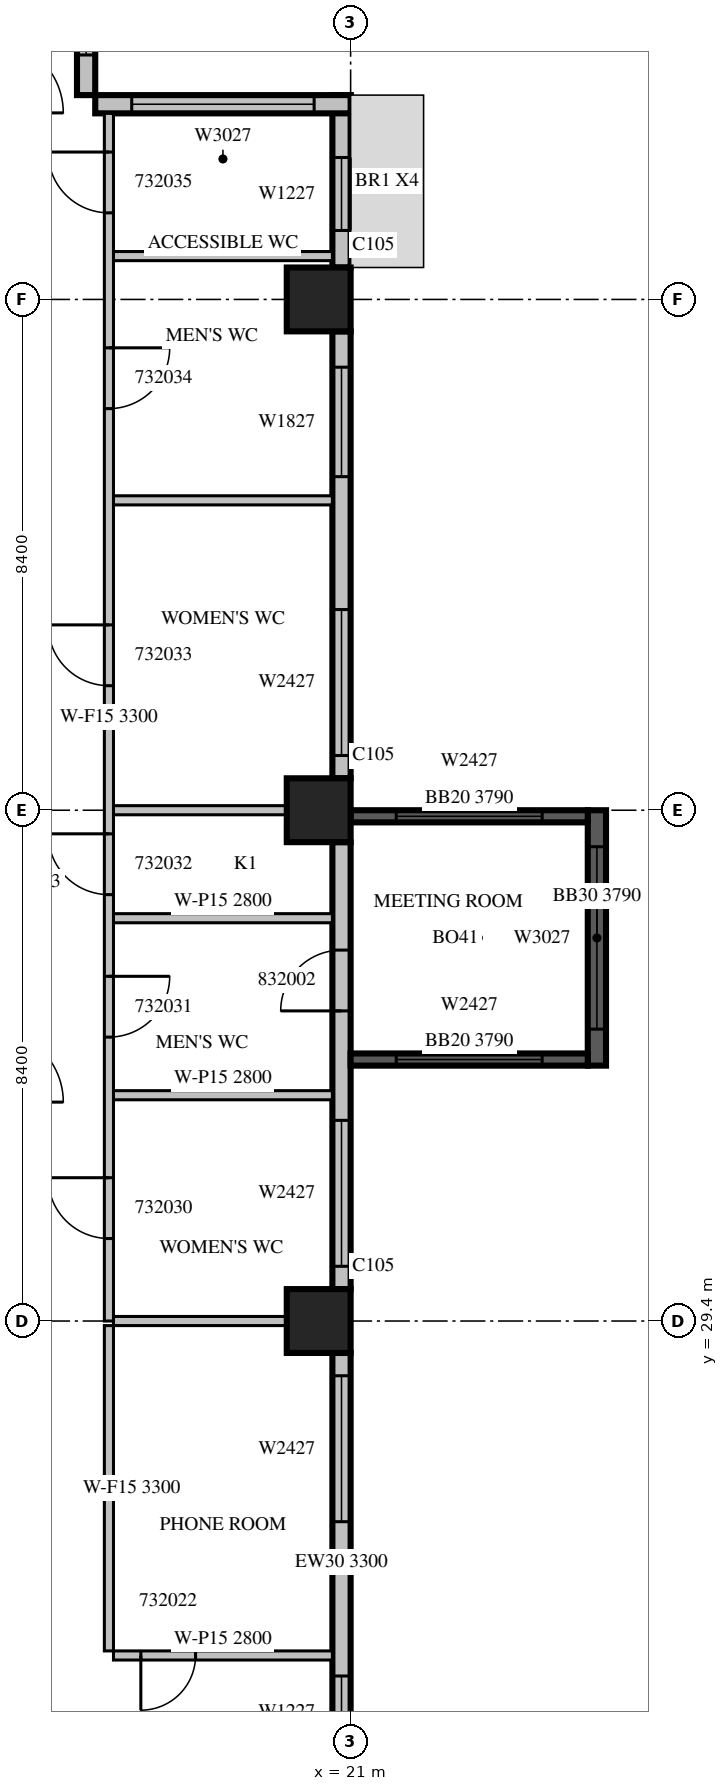
"""IFC4 building model, lengths in metres.
Left out: names, types, materials, properties, quantities, classifications, styles, units other than length and angle.
Written with IfcOpenShell. Run it as: python <this file> out.ifc"""

import sys

from ifc_helpers import new_model, si_unit, direction, frame, frame_2d, origin, origin_2d, place, context, subcontext, project, spatial, rectangle, extrude, source, transform, mapped, element, fill, save


model = new_model("IFC4")
c1 = context("Model", 3, precision=1e-05, world=origin(), true_north=direction((0.0, 1.0)))
c2 = subcontext(c1, "Body", "Model", "MODEL_VIEW")
j1 = project(units=[si_unit("LENGTHUNIT", "METRE"), si_unit("PLANEANGLEUNIT", "RADIAN")], contexts=[c1])
p1 = place(None, origin())
s1 = spatial("IfcSite", under=j1, at=p1, CompositionType="ELEMENT")
p2 = place(p1, origin())
s2 = spatial("IfcBuilding", under=s1, at=p2, CompositionType="ELEMENT")
p3 = place(p2, frame((0.0, 0.0, 145.5)))
s3 = spatial("IfcBuildingStorey", under=s2, at=p3, CompositionType="ELEMENT", Elevation=145.5)
m1 = source(origin(), c2, "Body", "SweptSolid", [
    extrude(rectangle(XDim=1.05, YDim=1.05, at=origin_2d()), origin(), (0.0, 0.0, 1.0), 4.2),
])
for number, where, z_axis, x_axis in (
    (1, (20.475, 29.4, 0.0), (0.0, 0.0, 1.0), (1.0, 0.0, 0.0)),
    (2, (20.475, 37.8, 0.0), (0.0, 0.0, 1.0), (1.0, 0.0, 0.0)),
    (3, (20.475, 46.2, 0.0), (0.0, 0.0, 1.0), (1.0, 0.0, 0.0)),
):
    element("IfcColumn", number, at=place(p3, frame(where, z_axis=z_axis, x_axis=x_axis)), inside=s3, PredefinedType="COLUMN", context=c2, shape_type="MappedRepresentation", body=[
        mapped(m1, transform((0.0, 0.0, 0.0), scale=1.0)),
    ])
m2 = source(origin(), c2, "Body", "SweptSolid", [
    extrude(rectangle(XDim=6.875, YDim=0.3, at=frame_2d((3.438, 0.0))), origin(), (0.0, 0.0, 1.0), 3.3),
])
p4 = place(p3, frame((20.85, 22.0, 0.0), z_axis=(0.0, 0.0, 1.0), x_axis=(0.0, 1.0, 0.0)))
e4 = element("IfcWall", 4, at=p4, inside=s3, PredefinedType="STANDARD", context=c2, shape_type="MappedRepresentation", body=[
    mapped(m2, transform((0.0, 0.0, 0.0), scale=1.0)),
])
m3 = source(origin(), c2, "Body", "SweptSolid", [
    extrude(rectangle(XDim=1.2, YDim=2.7, at=frame_2d((0.6, 1.35))), frame((0.0, 0.16, 0.0), z_axis=(0.0, -1.0, 0.0), x_axis=(1.0, 0.0, 0.0)), (0.0, 0.0, 1.0), 0.32),
])
p5 = place(p4, frame((0.362, 0.0, 0.6)))
e5 = element("IfcOpeningElement", 5, at=p5, cuts=e4, PredefinedType="OPENING", context=c2, shape_type="MappedRepresentation", body=[
    mapped(m3, transform((0.0, 0.0, 0.0), scale=1.0)),
])
m4 = source(origin(), c2, "Body", "SweptSolid", [
    extrude(rectangle(XDim=2.4, YDim=2.7, at=frame_2d((1.2, 1.35))), frame((0.0, 0.16, 0.0), z_axis=(0.0, -1.0, 0.0), x_axis=(1.0, 0.0, 0.0)), (0.0, 0.0, 1.0), 0.32),
])
p6 = place(p4, frame((4.1, 0.0, 0.6)))
e6 = element("IfcOpeningElement", 6, at=p6, cuts=e4, PredefinedType="OPENING", context=c2, shape_type="MappedRepresentation", body=[
    mapped(m4, transform((0.0, 0.0, 0.0), scale=1.0)),
])
m5 = source(origin(), c2, "Body", "SweptSolid", [
    extrude(rectangle(XDim=7.35, YDim=0.3, at=frame_2d((3.675, 0.0))), origin(), (0.0, 0.0, 1.0), 3.8),
])
p7 = place(p3, frame((20.85, 29.925, 0.0), z_axis=(0.0, 0.0, 1.0), x_axis=(0.0, 1.0, 0.0)))
e7 = element("IfcWall", 7, at=p7, inside=s3, PredefinedType="STANDARD", context=c2, shape_type="MappedRepresentation", body=[
    mapped(m5, transform((0.0, 0.0, 0.0), scale=1.0)),
])
p8 = place(p7, frame((0.375, 0.0, 0.6)))
e8 = element("IfcOpeningElement", 8, at=p8, cuts=e7, PredefinedType="OPENING", context=c2, shape_type="MappedRepresentation", body=[
    mapped(m4, transform((0.0, 0.0, 0.0), scale=1.0)),
])
m6 = source(origin(), c2, "Body", "SweptSolid", [
    extrude(rectangle(XDim=1.0, YDim=2.1, at=frame_2d((0.5, 1.05))), frame((0.0, 0.16, 0.0), z_axis=(0.0, -1.0, 0.0), x_axis=(1.0, 0.0, 0.0)), (0.0, 0.0, 1.0), 0.32),
])
p9 = place(p7, frame((4.575, 0.0, 0.0)))
e9 = element("IfcOpeningElement", 9, at=p9, cuts=e7, PredefinedType="OPENING", context=c2, shape_type="MappedRepresentation", body=[
    mapped(m6, transform((0.0, 0.0, 0.0), scale=1.0)),
])
p10 = place(p3, frame((20.85, 38.325, 0.0), z_axis=(0.0, 0.0, 1.0), x_axis=(0.0, 1.0, 0.0)))
e10 = element("IfcWall", 10, at=p10, inside=s3, PredefinedType="STANDARD", context=c2, shape_type="MappedRepresentation", body=[
    mapped(m5, transform((0.0, 0.0, 0.0), scale=1.0)),
])
p11 = place(p10, frame((0.375, 0.0, 0.6)))
e11 = element("IfcOpeningElement", 11, at=p11, cuts=e10, PredefinedType="OPENING", context=c2, shape_type="MappedRepresentation", body=[
    mapped(m4, transform((0.0, 0.0, 0.0), scale=1.0)),
])
m7 = source(origin(), c2, "Body", "SweptSolid", [
    extrude(rectangle(XDim=1.8, YDim=2.7, at=frame_2d((0.9, 1.35))), frame((0.0, 0.16, 0.0), z_axis=(0.0, -1.0, 0.0), x_axis=(1.0, 0.0, 0.0)), (0.0, 0.0, 1.0), 0.32),
])
p12 = place(p10, frame((4.96, 0.0, 0.6)))
e12 = element("IfcOpeningElement", 12, at=p12, cuts=e10, PredefinedType="OPENING", context=c2, shape_type="MappedRepresentation", body=[
    mapped(m7, transform((0.0, 0.0, 0.0), scale=1.0)),
])
m8 = source(origin(), c2, "Body", "SweptSolid", [
    extrude(rectangle(XDim=2.835, YDim=0.3, at=frame_2d((1.417, 0.0))), origin(), (0.0, 0.0, 1.0), 3.8),
])
p13 = place(p3, frame((20.85, 46.725, 0.0), z_axis=(0.0, 0.0, 1.0), x_axis=(0.0, 1.0, 0.0)))
e13 = element("IfcWall", 13, at=p13, inside=s3, PredefinedType="STANDARD", context=c2, shape_type="MappedRepresentation", body=[
    mapped(m8, transform((0.0, 0.0, 0.0), scale=1.0)),
])
p14 = place(p13, frame((0.609, 0.0, 0.6)))
e14 = element("IfcOpeningElement", 14, at=p14, cuts=e13, PredefinedType="OPENING", context=c2, shape_type="MappedRepresentation", body=[
    mapped(m3, transform((0.0, 0.0, 0.0), scale=1.0)),
])
m9 = source(origin(), c2, "Body", "SweptSolid", [
    extrude(rectangle(XDim=4.2, YDim=0.3, at=frame_2d((2.1, 0.0))), origin(), (0.0, 0.0, 1.0), 3.8),
])
p15 = place(p3, frame((21.0, 49.41, 0.0), z_axis=(0.0, 0.0, 1.0), x_axis=(-1.0, 0.0, 0.0)))
e15 = element("IfcWall", 15, at=p15, inside=s3, PredefinedType="STANDARD", context=c2, shape_type="MappedRepresentation", body=[
    mapped(m9, transform((0.0, 0.0, 0.0), scale=1.0)),
])
m10 = source(origin(), c2, "Body", "SweptSolid", [
    extrude(rectangle(XDim=3.0, YDim=2.7, at=frame_2d((1.5, 1.35))), frame((0.0, 0.16, 0.0), z_axis=(0.0, -1.0, 0.0), x_axis=(1.0, 0.0, 0.0)), (0.0, 0.0, 1.0), 0.32),
])
p16 = place(p15, frame((0.6, 0.0, 0.6)))
e16 = element("IfcOpeningElement", 16, at=p16, cuts=e15, PredefinedType="OPENING", context=c2, shape_type="MappedRepresentation", body=[
    mapped(m10, transform((0.0, 0.0, 0.0), scale=1.0)),
])
m11 = source(origin(), c2, "Body", "SweptSolid", [
    extrude(rectangle(XDim=2.52, YDim=0.3, at=frame_2d((1.26, 0.0))), origin(), (0.0, 0.0, 1.0), 3.8),
])
p17 = place(p3, frame((16.65, 49.56, 0.0), z_axis=(0.0, 0.0, 1.0), x_axis=(0.0, 1.0, 0.0)))
e17 = element("IfcWall", 17, at=p17, inside=s3, PredefinedType="STANDARD", context=c2, shape_type="MappedRepresentation", body=[
    mapped(m11, transform((0.0, 0.0, 0.0), scale=1.0)),
])
p18 = place(p17, frame((0.66, 0.0, 0.6)))
e18 = element("IfcOpeningElement", 18, at=p18, cuts=e17, PredefinedType="OPENING", context=c2, shape_type="MappedRepresentation", body=[
    mapped(m3, transform((0.0, 0.0, 0.0), scale=1.0)),
])
m12 = source(origin(), c2, "Body", "SweptSolid", [
    extrude(rectangle(XDim=4.2, YDim=0.3, at=frame_2d((2.1, 0.0))), origin(), (0.0, 0.0, 1.0), 3.79),
])
p19 = place(p3, frame((25.05, 33.6, 0.0), z_axis=(0.0, 0.0, 1.0), x_axis=(0.0, 1.0, 0.0)))
e19 = element("IfcWall", 19, at=p19, inside=s3, PredefinedType="SOLIDWALL", context=c2, shape_type="MappedRepresentation", body=[
    mapped(m12, transform((0.0, 0.0, 0.0), scale=1.0)),
])
p20 = place(p19, frame((0.6, 0.0, 0.6)))
e20 = element("IfcOpeningElement", 20, at=p20, cuts=e19, PredefinedType="OPENING", context=c2, shape_type="MappedRepresentation", body=[
    mapped(m10, transform((0.0, 0.0, 0.0), scale=1.0)),
])
m13 = source(origin(), c2, "Body", "SweptSolid", [
    extrude(rectangle(XDim=3.9, YDim=0.2, at=frame_2d((1.95, 0.0))), origin(), (0.0, 0.0, 1.0), 3.79),
])
p21 = place(p3, frame((21.0, 33.7, 0.0), z_axis=(0.0, 0.0, 1.0), x_axis=(1.0, 0.0, 0.0)))
e21 = element("IfcWall", 21, at=p21, inside=s3, PredefinedType="SOLIDWALL", context=c2, shape_type="MappedRepresentation", body=[
    mapped(m13, transform((0.0, 0.0, 0.0), scale=1.0)),
])
m14 = source(origin(), c2, "Body", "SweptSolid", [
    extrude(rectangle(XDim=2.4, YDim=2.7, at=frame_2d((1.2, 1.35))), frame((0.0, 0.11, 0.0), z_axis=(0.0, -1.0, 0.0), x_axis=(1.0, 0.0, 0.0)), (0.0, 0.0, 1.0), 0.22),
])
p22 = place(p21, frame((0.75, 0.0, 0.6)))
e22 = element("IfcOpeningElement", 22, at=p22, cuts=e21, PredefinedType="OPENING", context=c2, shape_type="MappedRepresentation", body=[
    mapped(m14, transform((0.0, 0.0, 0.0), scale=1.0)),
])
p23 = place(p3, frame((21.0, 37.7, 0.0), z_axis=(0.0, 0.0, 1.0), x_axis=(1.0, 0.0, 0.0)))
e23 = element("IfcWall", 23, at=p23, inside=s3, PredefinedType="SOLIDWALL", context=c2, shape_type="MappedRepresentation", body=[
    mapped(m13, transform((0.0, 0.0, 0.0), scale=1.0)),
])
p24 = place(p23, frame((0.75, 0.0, 0.6)))
e24 = element("IfcOpeningElement", 24, at=p24, cuts=e23, PredefinedType="OPENING", context=c2, shape_type="MappedRepresentation", body=[
    mapped(m14, transform((0.0, 0.0, 0.0), scale=1.0)),
])
m15 = source(origin(), c2, "Body", "SweptSolid", [
    extrude(rectangle(XDim=3.6, YDim=0.15, at=frame_2d((1.8, 0.0))), origin(), (0.0, 0.0, 1.0), 2.8),
])
p25 = place(p3, frame((17.1, 23.9, 0.0), z_axis=(0.0, 0.0, 1.0), x_axis=(1.0, 0.0, 0.0)))
e25 = element("IfcWall", 25, at=p25, inside=s3, PredefinedType="PARTITIONING", context=c2, shape_type="MappedRepresentation", body=[
    mapped(m15, transform((0.0, 0.0, 0.0), scale=1.0)),
])
m16 = source(origin(), c2, "Body", "SweptSolid", [
    extrude(rectangle(XDim=0.9, YDim=2.1, at=frame_2d((0.45, 1.05))), frame((0.0, 0.085, 0.0), z_axis=(0.0, -1.0, 0.0), x_axis=(1.0, 0.0, 0.0)), (0.0, 0.0, 1.0), 0.17),
])
p26 = place(p25, frame((0.45, 0.0, 0.0)))
e26 = element("IfcOpeningElement", 26, at=p26, cuts=e25, PredefinedType="OPENING", context=c2, shape_type="MappedRepresentation", body=[
    mapped(m16, transform((0.0, 0.0, 0.0), scale=1.0)),
])
m17 = source(origin(), c2, "Body", "SweptSolid", [
    extrude(rectangle(XDim=5.35, YDim=0.15, at=frame_2d((2.675, 0.0))), origin(), (0.0, 0.0, 1.0), 3.3),
])
p27 = place(p3, frame((17.025, 29.325, 0.0), z_axis=(0.0, 0.0, 1.0), x_axis=(0.0, -1.0, 0.0)))
e27 = element("IfcWall", 27, at=p27, inside=s3, PredefinedType="PARTITIONING", context=c2, shape_type="MappedRepresentation", body=[
    mapped(m17, transform((0.0, 0.0, 0.0), scale=1.0)),
])
m18 = source(origin(), c2, "Body", "SweptSolid", [
    extrude(rectangle(XDim=2.851, YDim=0.15, at=frame_2d((1.425, 0.0))), origin(), (0.0, 0.0, 1.0), 3.8),
])
p28 = place(p3, frame((19.951, 29.4, 0.0), z_axis=(0.0, 0.0, 1.0), x_axis=(-1.0, 0.0, 0.0)))
e28 = element("IfcWall", 28, at=p28, inside=s3, PredefinedType="PARTITIONING", context=c2, shape_type="MappedRepresentation", body=[
    mapped(m18, transform((0.0, 0.0, 0.0), scale=1.0)),
])
for number, where, z_axis, x_axis in (
    (29, (17.1, 33.113, 0.0), (0.0, 0.0, 1.0), (1.0, 0.0, 0.0)),
    (30, (17.1, 36.024, 0.0), (0.0, 0.0, 1.0), (1.0, 0.0, 0.0)),
):
    element("IfcWall", number, at=place(p3, frame(where, z_axis=z_axis, x_axis=x_axis)), inside=s3, PredefinedType="PARTITIONING", context=c2, shape_type="MappedRepresentation", body=[
        mapped(m15, transform((0.0, 0.0, 0.0), scale=1.0)),
    ])
m19 = source(origin(), c2, "Body", "SweptSolid", [
    extrude(rectangle(XDim=3.6, YDim=0.15, at=frame_2d((1.8, 0.0))), origin(), (0.0, 0.0, 1.0), 3.8),
])
for number, where, z_axis, x_axis in (
    (31, (17.1, 42.896, 0.0), (0.0, 0.0, 1.0), (1.0, 0.0, 0.0)),
    (32, (17.1, 46.913, 0.0), (0.0, 0.0, 1.0), (1.0, 0.0, 0.0)),
):
    element("IfcWall", number, at=place(p3, frame(where, z_axis=z_axis, x_axis=x_axis)), inside=s3, PredefinedType="PARTITIONING", context=c2, shape_type="MappedRepresentation", body=[
        mapped(m19, transform((0.0, 0.0, 0.0), scale=1.0)),
    ])
p29 = place(p3, frame((19.951, 37.8, 0.0), z_axis=(0.0, 0.0, 1.0), x_axis=(-1.0, 0.0, 0.0)))
e33 = element("IfcWall", 33, at=p29, inside=s3, PredefinedType="PARTITIONING", context=c2, shape_type="MappedRepresentation", body=[
    mapped(m18, transform((0.0, 0.0, 0.0), scale=1.0)),
])
m20 = source(origin(), c2, "Body", "SweptSolid", [
    extrude(rectangle(XDim=19.86, YDim=0.15, at=frame_2d((9.93, 0.0))), origin(), (0.0, 0.0, 1.0), 3.3),
])
p30 = place(p3, frame((17.025, 49.26, 0.0), z_axis=(0.0, 0.0, 1.0), x_axis=(0.0, -1.0, 0.0)))
e34 = element("IfcWall", 34, at=p30, inside=s3, PredefinedType="PARTITIONING", context=c2, shape_type="MappedRepresentation", body=[
    mapped(m20, transform((0.0, 0.0, 0.0), scale=1.0)),
])
m21 = source(origin(), c2, "Body", "SweptSolid", [
    extrude(rectangle(XDim=1.0, YDim=2.1, at=frame_2d((0.5, 1.05))), frame((0.0, 0.085, 0.0), z_axis=(0.0, -1.0, 0.0), x_axis=(1.0, 0.0, 0.0)), (0.0, 0.0, 1.0), 0.17),
])
p31 = place(p30, frame((17.503, 0.0, 0.0)))
e35 = element("IfcOpeningElement", 35, at=p31, cuts=e34, PredefinedType="OPENING", context=c2, shape_type="MappedRepresentation", body=[
    mapped(m21, transform((0.0, 0.0, 0.0), scale=1.0)),
])
p32 = place(p30, frame((14.191, 0.0, 0.0)))
e36 = element("IfcOpeningElement", 36, at=p32, cuts=e34, PredefinedType="OPENING", context=c2, shape_type="MappedRepresentation", body=[
    mapped(m21, transform((0.0, 0.0, 0.0), scale=1.0)),
])
p33 = place(p30, frame((11.848, 0.0, 0.0)))
e37 = element("IfcOpeningElement", 37, at=p33, cuts=e34, PredefinedType="OPENING", context=c2, shape_type="MappedRepresentation", body=[
    mapped(m21, transform((0.0, 0.0, 0.0), scale=1.0)),
])
p34 = place(p30, frame((8.412, 0.0, 0.0)))
e38 = element("IfcOpeningElement", 38, at=p34, cuts=e34, PredefinedType="OPENING", context=c2, shape_type="MappedRepresentation", body=[
    mapped(m21, transform((0.0, 0.0, 0.0), scale=1.0)),
])
p35 = place(p30, frame((3.856, 0.0, 0.0)))
e39 = element("IfcOpeningElement", 39, at=p35, cuts=e34, PredefinedType="OPENING", context=c2, shape_type="MappedRepresentation", body=[
    mapped(m21, transform((0.0, 0.0, 0.0), scale=1.0)),
])
p36 = place(p30, frame((0.636, 0.0, 0.0)))
e40 = element("IfcOpeningElement", 40, at=p36, cuts=e34, PredefinedType="OPENING", context=c2, shape_type="MappedRepresentation", body=[
    mapped(m21, transform((0.0, 0.0, 0.0), scale=1.0)),
])
m22 = source(origin(), c2, "Body", "SweptSolid", [
    extrude(rectangle(XDim=1.2, YDim=2.7, at=frame_2d((0.6, 1.35))), frame((0.0, 0.03, 0.0), z_axis=(0.0, -1.0, 0.0), x_axis=(1.0, 0.0, 0.0)), (0.0, 0.0, 1.0), 0.06),
])
p37 = place(p5, origin())
e41 = element("IfcWindow", 41, at=p37, inside=s3, PartitioningType="SINGLE_PANEL", PredefinedType="WINDOW", context=c2, shape_type="MappedRepresentation", body=[
    mapped(m22, transform((0.0, 0.0, 0.0), scale=1.0)),
])
fill(e5, e41)
m23 = source(origin(), c2, "Body", "SweptSolid", [
    extrude(rectangle(XDim=2.4, YDim=2.7, at=frame_2d((1.2, 1.35))), frame((0.0, 0.03, 0.0), z_axis=(0.0, -1.0, 0.0), x_axis=(1.0, 0.0, 0.0)), (0.0, 0.0, 1.0), 0.06),
])
p38 = place(p6, origin())
e42 = element("IfcWindow", 42, at=p38, inside=s3, PartitioningType="SINGLE_PANEL", PredefinedType="WINDOW", context=c2, shape_type="MappedRepresentation", body=[
    mapped(m23, transform((0.0, 0.0, 0.0), scale=1.0)),
])
fill(e6, e42)
p39 = place(p8, origin())
e43 = element("IfcWindow", 43, at=p39, inside=s3, PartitioningType="SINGLE_PANEL", PredefinedType="WINDOW", context=c2, shape_type="MappedRepresentation", body=[
    mapped(m23, transform((0.0, 0.0, 0.0), scale=1.0)),
])
fill(e8, e43)
p40 = place(p11, origin())
e44 = element("IfcWindow", 44, at=p40, inside=s3, PartitioningType="SINGLE_PANEL", PredefinedType="WINDOW", context=c2, shape_type="MappedRepresentation", body=[
    mapped(m23, transform((0.0, 0.0, 0.0), scale=1.0)),
])
fill(e11, e44)
m24 = source(origin(), c2, "Body", "SweptSolid", [
    extrude(rectangle(XDim=1.8, YDim=2.7, at=frame_2d((0.9, 1.35))), frame((0.0, 0.03, 0.0), z_axis=(0.0, -1.0, 0.0), x_axis=(1.0, 0.0, 0.0)), (0.0, 0.0, 1.0), 0.06),
])
p41 = place(p12, origin())
e45 = element("IfcWindow", 45, at=p41, inside=s3, PartitioningType="SINGLE_PANEL", PredefinedType="WINDOW", context=c2, shape_type="MappedRepresentation", body=[
    mapped(m24, transform((0.0, 0.0, 0.0), scale=1.0)),
])
fill(e12, e45)
p42 = place(p14, origin())
e46 = element("IfcWindow", 46, at=p42, inside=s3, PartitioningType="SINGLE_PANEL", PredefinedType="WINDOW", context=c2, shape_type="MappedRepresentation", body=[
    mapped(m22, transform((0.0, 0.0, 0.0), scale=1.0)),
])
fill(e14, e46)
m25 = source(origin(), c2, "Body", "SweptSolid", [
    extrude(rectangle(XDim=3.0, YDim=2.7, at=frame_2d((1.5, 1.35))), frame((0.0, 0.03, 0.0), z_axis=(0.0, -1.0, 0.0), x_axis=(1.0, 0.0, 0.0)), (0.0, 0.0, 1.0), 0.06),
])
p43 = place(p16, origin())
e47 = element("IfcWindow", 47, at=p43, inside=s3, PartitioningType="SINGLE_PANEL", PredefinedType="WINDOW", context=c2, shape_type="MappedRepresentation", body=[
    mapped(m25, transform((0.0, 0.0, 0.0), scale=1.0)),
])
fill(e16, e47)
p44 = place(p18, origin())
e48 = element("IfcWindow", 48, at=p44, inside=s3, PartitioningType="SINGLE_PANEL", PredefinedType="WINDOW", context=c2, shape_type="MappedRepresentation", body=[
    mapped(m22, transform((0.0, 0.0, 0.0), scale=1.0)),
])
fill(e18, e48)
p45 = place(p20, origin())
e49 = element("IfcWindow", 49, at=p45, inside=s3, PartitioningType="SINGLE_PANEL", PredefinedType="WINDOW", context=c2, shape_type="MappedRepresentation", body=[
    mapped(m25, transform((0.0, 0.0, 0.0), scale=1.0)),
])
fill(e20, e49)
p46 = place(p22, origin())
e50 = element("IfcWindow", 50, at=p46, inside=s3, PartitioningType="SINGLE_PANEL", PredefinedType="WINDOW", context=c2, shape_type="MappedRepresentation", body=[
    mapped(m23, transform((0.0, 0.0, 0.0), scale=1.0)),
])
fill(e22, e50)
p47 = place(p24, origin())
e51 = element("IfcWindow", 51, at=p47, inside=s3, PartitioningType="SINGLE_PANEL", PredefinedType="WINDOW", context=c2, shape_type="MappedRepresentation", body=[
    mapped(m23, transform((0.0, 0.0, 0.0), scale=1.0)),
])
fill(e24, e51)
m26 = source(origin(), c2, "Body", "SweptSolid", [
    extrude(rectangle(XDim=0.9, YDim=2.1, at=frame_2d((0.45, 1.05))), frame((0.0, 0.025, 0.0), z_axis=(0.0, -1.0, 0.0), x_axis=(1.0, 0.0, 0.0)), (0.0, 0.0, 1.0), 0.05),
])
p48 = place(p26, origin())
e52 = element("IfcDoor", 52, at=p48, inside=s3, OperationType="SINGLE_SWING_RIGHT", PredefinedType="DOOR", context=c2, shape_type="MappedRepresentation", body=[
    mapped(m26, transform((0.0, 0.0, 0.0), scale=1.0)),
])
fill(e26, e52)
m27 = source(origin(), c2, "Body", "SweptSolid", [
    extrude(rectangle(XDim=1.0, YDim=2.1, at=frame_2d((0.5, 1.05))), frame((0.0, 0.025, 0.0), z_axis=(0.0, -1.0, 0.0), x_axis=(1.0, 0.0, 0.0)), (0.0, 0.0, 1.0), 0.05),
])
p49 = place(p31, origin())
e53 = element("IfcDoor", 53, at=p49, inside=s3, OperationType="SINGLE_SWING_RIGHT", PredefinedType="DOOR", context=c2, shape_type="MappedRepresentation", body=[
    mapped(m27, transform((0.0, 0.0, 0.0), scale=1.0)),
])
fill(e35, e53)
p50 = place(p32, origin())
e54 = element("IfcDoor", 54, at=p50, inside=s3, OperationType="SINGLE_SWING_LEFT", PredefinedType="DOOR", context=c2, shape_type="MappedRepresentation", body=[
    mapped(m27, transform((0.0, 0.0, 0.0), scale=1.0)),
])
fill(e36, e54)
p51 = place(p33, origin())
e55 = element("IfcDoor", 55, at=p51, inside=s3, OperationType="SINGLE_SWING_RIGHT", PredefinedType="DOOR", context=c2, shape_type="MappedRepresentation", body=[
    mapped(m27, transform((0.0, 0.0, 0.0), scale=1.0)),
])
fill(e37, e55)
p52 = place(p34, origin())
e56 = element("IfcDoor", 56, at=p52, inside=s3, OperationType="SINGLE_SWING_RIGHT", PredefinedType="DOOR", context=c2, shape_type="MappedRepresentation", body=[
    mapped(m27, transform((0.0, 0.0, 0.0), scale=1.0)),
])
fill(e38, e56)
p53 = place(p35, origin())
e57 = element("IfcDoor", 57, at=p53, inside=s3, OperationType="SINGLE_SWING_LEFT", PredefinedType="DOOR", context=c2, shape_type="MappedRepresentation", body=[
    mapped(m27, transform((0.0, 0.0, 0.0), scale=1.0)),
])
fill(e39, e57)
p54 = place(p36, origin())
e58 = element("IfcDoor", 58, at=p54, inside=s3, OperationType="SINGLE_SWING_RIGHT", PredefinedType="DOOR", context=c2, shape_type="MappedRepresentation", body=[
    mapped(m27, transform((0.0, 0.0, 0.0), scale=1.0)),
])
fill(e40, e58)
p55 = place(p9, origin())
e59 = element("IfcDoor", 59, at=p55, inside=s3, OperationType="SINGLE_SWING_LEFT", PredefinedType="DOOR", context=c2, shape_type="MappedRepresentation", body=[
    mapped(m27, transform((0.0, 0.0, 0.0), scale=1.0)),
])
fill(e9, e59)
save(model, sys.argv[1])
